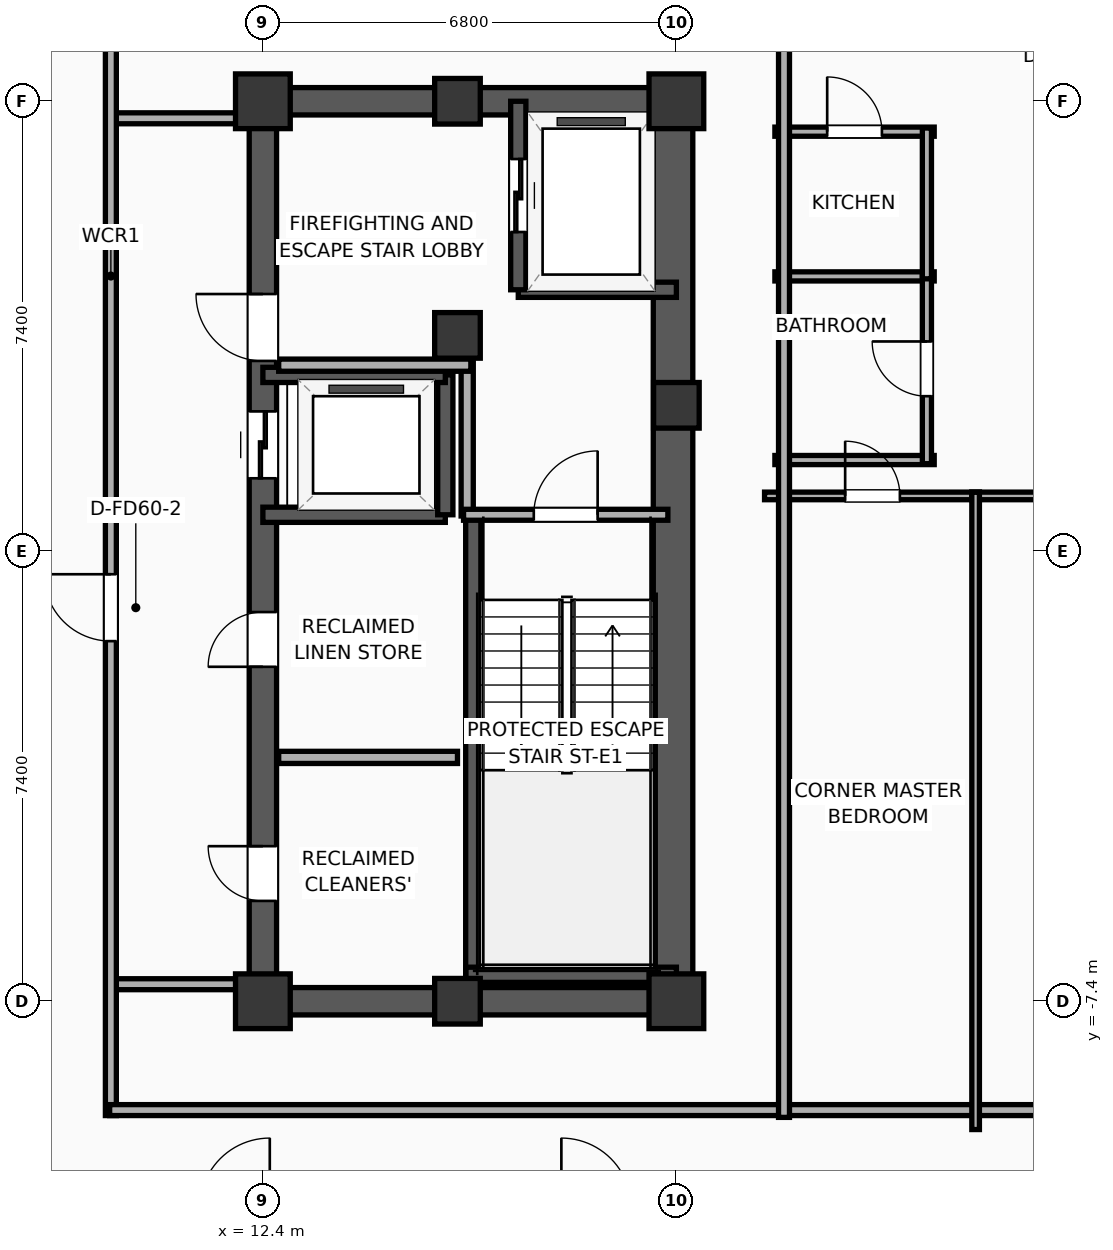
"""IFC4 building model, lengths in metres.
Left out: names, types, materials, properties, quantities, classifications, styles, units other than length and angle.
Written with IfcOpenShell. Run it as: python <this file> out.ifc"""

import sys

from ifc_helpers import new_model, si_unit, direction, frame, frame_2d, origin, origin_2d, place, context, subcontext, project, spatial, rectangle, extrude, element, fill, save


model = new_model("IFC4")
c1 = context("Model", 3, precision=1e-05, world=origin(), true_north=direction((0.0, 1.0)))
c2 = subcontext(c1, "Body", "Model", "MODEL_VIEW")
j1 = project(units=[si_unit("LENGTHUNIT", "METRE"), si_unit("PLANEANGLEUNIT", "RADIAN")], contexts=[c1])
p1 = place(None, origin())
s1 = spatial("IfcSite", under=j1, at=p1, CompositionType="ELEMENT")
p2 = place(p1, origin())
s2 = spatial("IfcBuilding", under=s1, at=p2, CompositionType="ELEMENT")
p3 = place(p2, frame((0.0, 0.0, 215.8)))
s3 = spatial("IfcBuildingStorey", under=s2, at=p3, CompositionType="ELEMENT", Elevation=215.8)
p4 = place(p3, frame((12.4, -7.4, 0.0), z_axis=(0.0, 0.0, 1.0), x_axis=(1.0, 0.0, 0.0)))
e1 = element("IfcColumn", 1, at=p4, inside=s3, PredefinedType="COLUMN", context=c2, shape_type="SweptSolid", body=[
    extrude(rectangle(XDim=0.9, YDim=0.9, at=origin_2d()), origin(), (0.0, 0.0, 1.0), 3.9),
])
p5 = place(p3, frame((15.6, 3.55, 0.0), z_axis=(0.0, 0.0, 1.0), x_axis=(1.0, 0.0, 0.0)))
e2 = element("IfcColumn", 2, at=p5, inside=s3, PredefinedType="COLUMN", context=c2, shape_type="SweptSolid", body=[
    extrude(rectangle(XDim=0.75, YDim=0.75, at=origin_2d()), origin(), (0.0, 0.0, 1.0), 3.9),
])
p6 = place(p3, frame((12.4, 7.4, 0.0), z_axis=(0.0, 0.0, 1.0), x_axis=(1.0, 0.0, 0.0)))
e3 = element("IfcColumn", 3, at=p6, inside=s3, PredefinedType="COLUMN", context=c2, shape_type="SweptSolid", body=[
    extrude(rectangle(XDim=0.9, YDim=0.9, at=origin_2d()), origin(), (0.0, 0.0, 1.0), 3.9),
])
for number, where, z_axis, x_axis in (
    (4, (15.6, -7.4, 0.0), (0.0, 0.0, 1.0), (1.0, 0.0, 0.0)),
    (5, (15.6, 7.4, 0.0), (0.0, 0.0, 1.0), (1.0, 0.0, 0.0)),
):
    element("IfcColumn", number, at=place(p3, frame(where, z_axis=z_axis, x_axis=x_axis)), inside=s3, PredefinedType="COLUMN", context=c2, shape_type="SweptSolid", body=[
        extrude(rectangle(XDim=0.75, YDim=0.75, at=origin_2d()), origin(), (0.0, 0.0, 1.0), 3.9),
    ])
p7 = place(p3, frame((19.2, -7.4, 0.0), z_axis=(0.0, 0.0, 1.0), x_axis=(1.0, 0.0, 0.0)))
e6 = element("IfcColumn", 6, at=p7, inside=s3, PredefinedType="COLUMN", context=c2, shape_type="SweptSolid", body=[
    extrude(rectangle(XDim=0.9, YDim=0.9, at=origin_2d()), origin(), (0.0, 0.0, 1.0), 3.9),
])
p8 = place(p3, frame((19.2, 2.4, 0.0), z_axis=(0.0, 0.0, 1.0), x_axis=(1.0, 0.0, 0.0)))
e7 = element("IfcColumn", 7, at=p8, inside=s3, PredefinedType="COLUMN", context=c2, shape_type="SweptSolid", body=[
    extrude(rectangle(XDim=0.75, YDim=0.75, at=origin_2d()), origin(), (0.0, 0.0, 1.0), 3.9),
])
p9 = place(p3, frame((19.2, 7.4, 0.0), z_axis=(0.0, 0.0, 1.0), x_axis=(1.0, 0.0, 0.0)))
e8 = element("IfcColumn", 8, at=p9, inside=s3, PredefinedType="COLUMN", context=c2, shape_type="SweptSolid", body=[
    extrude(rectangle(XDim=0.9, YDim=0.9, at=origin_2d()), origin(), (0.0, 0.0, 1.0), 3.9),
])
for number, where, z_axis, x_axis in (
    (9, (12.175, -7.4, 0.0), (0.0, 0.0, 1.0), (1.0, 0.0, 0.0)),
    (10, (12.175, 7.4, 0.0), (0.0, 0.0, 1.0), (1.0, 0.0, 0.0)),
):
    element("IfcWall", number, at=place(p3, frame(where, z_axis=z_axis, x_axis=x_axis)), inside=s3, PredefinedType="SHEAR", context=c2, shape_type="SweptSolid", body=[
        extrude(rectangle(XDim=7.25, YDim=0.45, at=frame_2d((3.625, 0.0))), origin(), (0.0, 0.0, 1.0), 3.65),
    ])
p10 = place(p3, frame((12.4, -7.4, 0.0), z_axis=(0.0, 0.0, 1.0), x_axis=(0.0, 1.0, 0.0)))
e11 = element("IfcWall", 11, at=p10, inside=s3, PredefinedType="SHEAR", context=c2, shape_type="SweptSolid", body=[
    extrude(rectangle(XDim=14.8, YDim=0.45, at=frame_2d((7.4, 0.0))), origin(), (0.0, 0.0, 1.0), 3.65),
])
p11 = place(p10, frame((8.6, 0.0, 0.0)))
e12 = element("IfcOpeningElement", 12, at=p11, cuts=e11, PredefinedType="OPENING", context=c2, shape_type="SweptSolid", body=[
    extrude(rectangle(XDim=1.1, YDim=2.05, at=frame_2d((0.55, 1.025))), frame((0.0, 0.235, 0.0), z_axis=(0.0, -1.0, 0.0), x_axis=(1.0, 0.0, 0.0)), (0.0, 0.0, 1.0), 0.47),
])
p12 = place(p10, frame((10.53, 0.0, 0.0)))
e13 = element("IfcOpeningElement", 13, at=p12, cuts=e11, PredefinedType="OPENING", context=c2, shape_type="SweptSolid", body=[
    extrude(rectangle(XDim=1.1, YDim=2.05, at=frame_2d((0.55, 1.025))), frame((0.0, 0.235, 0.0), z_axis=(0.0, -1.0, 0.0), x_axis=(1.0, 0.0, 0.0)), (0.0, 0.0, 1.0), 0.47),
])
p13 = place(p10, frame((1.65, 0.0, 0.0)))
e14 = element("IfcOpeningElement", 14, at=p13, cuts=e11, PredefinedType="OPENING", context=c2, shape_type="SweptSolid", body=[
    extrude(rectangle(XDim=0.9, YDim=2.05, at=frame_2d((0.45, 1.025))), frame((0.0, 0.235, 0.0), z_axis=(0.0, -1.0, 0.0), x_axis=(1.0, 0.0, 0.0)), (0.0, 0.0, 1.0), 0.47),
])
p14 = place(p10, frame((5.5, 0.0, 0.0)))
e15 = element("IfcOpeningElement", 15, at=p14, cuts=e11, PredefinedType="OPENING", context=c2, shape_type="SweptSolid", body=[
    extrude(rectangle(XDim=0.9, YDim=2.05, at=frame_2d((0.45, 1.025))), frame((0.0, 0.235, 0.0), z_axis=(0.0, -1.0, 0.0), x_axis=(1.0, 0.0, 0.0)), (0.0, 0.0, 1.0), 0.47),
])
p15 = place(p3, frame((19.145, -7.4, 0.0), z_axis=(0.0, 0.0, 1.0), x_axis=(0.0, 1.0, 0.0)))
e16 = element("IfcWall", 16, at=p15, inside=s3, PredefinedType="SHEAR", context=c2, shape_type="SweptSolid", body=[
    extrude(rectangle(XDim=14.8, YDim=0.65, at=frame_2d((7.4, 0.0))), origin(), (0.0, 0.0, 1.0), 3.65),
])
p16 = place(p3, frame((15.86, -7.085, 0.0), z_axis=(0.0, 0.0, 1.0), x_axis=(0.0, 1.0, 0.0)))
e17 = element("IfcWall", 17, at=p16, inside=s3, PredefinedType="SOLIDWALL", context=c2, shape_type="SweptSolid", body=[
    extrude(rectangle(XDim=7.685, YDim=0.25, at=frame_2d((3.843, 0.0))), origin(), (0.0, 0.0, 1.0), 3.65),
])
p17 = place(p3, frame((15.74, -6.965, 0.0), z_axis=(0.0, 0.0, 1.0), x_axis=(1.0, 0.0, 0.0)))
e18 = element("IfcWall", 18, at=p17, inside=s3, PredefinedType="SOLIDWALL", context=c2, shape_type="SweptSolid", body=[
    extrude(rectangle(XDim=3.46, YDim=0.25, at=frame_2d((1.73, 0.0))), origin(), (0.0, 0.0, 1.0), 3.65),
])
p18 = place(p3, frame((16.6, 4.3, 0.0), z_axis=(0.0, 0.0, 1.0), x_axis=(1.0, 0.0, 0.0)))
e19 = element("IfcWall", 19, at=p18, inside=s3, PredefinedType="SOLIDWALL", context=c2, shape_type="SweptSolid", body=[
    extrude(rectangle(XDim=2.6, YDim=0.25, at=frame_2d((1.3, 0.0))), origin(), (0.0, 0.0, 1.0), 3.65),
])
p19 = place(p3, frame((16.6, 7.4, 0.0), z_axis=(0.0, 0.0, 1.0), x_axis=(0.0, -1.0, 0.0)))
e20 = element("IfcWall", 20, at=p19, inside=s3, PredefinedType="SOLIDWALL", context=c2, shape_type="SweptSolid", body=[
    extrude(rectangle(XDim=3.1, YDim=0.25, at=frame_2d((1.55, 0.0))), origin(), (0.0, 0.0, 1.0), 3.65),
])
p20 = place(p19, frame((0.95, 0.0, 0.0)))
e21 = element("IfcOpeningElement", 21, at=p20, cuts=e20, PredefinedType="OPENING", context=c2, shape_type="SweptSolid", body=[
    extrude(rectangle(XDim=1.2, YDim=2.05, at=frame_2d((0.6, 1.025))), frame((0.0, 0.135, 0.0), z_axis=(0.0, -1.0, 0.0), x_axis=(1.0, 0.0, 0.0)), (0.0, 0.0, 1.0), 0.27),
])
p21 = place(p3, frame((12.4, 0.6, 0.0), z_axis=(0.0, 0.0, 1.0), x_axis=(1.0, 0.0, 0.0)))
e22 = element("IfcWall", 22, at=p21, inside=s3, PredefinedType="SOLIDWALL", context=c2, shape_type="SweptSolid", body=[
    extrude(rectangle(XDim=3.0, YDim=0.25, at=frame_2d((1.5, 0.0))), origin(), (0.0, 0.0, 1.0), 3.65),
])
p22 = place(p3, frame((15.4, 0.6, 0.0), z_axis=(0.0, 0.0, 1.0), x_axis=(0.0, 1.0, 0.0)))
e23 = element("IfcWall", 23, at=p22, inside=s3, PredefinedType="SOLIDWALL", context=c2, shape_type="SweptSolid", body=[
    extrude(rectangle(XDim=2.3, YDim=0.25, at=frame_2d((1.15, 0.0))), origin(), (0.0, 0.0, 1.0), 3.65),
])
p23 = place(p3, frame((15.4, 2.9, 0.0), z_axis=(0.0, 0.0, 1.0), x_axis=(-1.0, 0.0, 0.0)))
e24 = element("IfcWall", 24, at=p23, inside=s3, PredefinedType="SOLIDWALL", context=c2, shape_type="SweptSolid", body=[
    extrude(rectangle(XDim=3.0, YDim=0.25, at=frame_2d((1.5, 0.0))), origin(), (0.0, 0.0, 1.0), 3.65),
])
p24 = place(p3, frame((15.76, 0.58, 0.0), z_axis=(0.0, 0.0, 1.0), x_axis=(0.0, 1.0, 0.0)))
e25 = element("IfcWall", 25, at=p24, inside=s3, PredefinedType="PARTITIONING", context=c2, shape_type="SweptSolid", body=[
    extrude(rectangle(XDim=2.52, YDim=0.2, at=frame_2d((1.26, 0.0))), origin(), (0.0, 0.0, 1.0), 3.65),
])
p25 = place(p3, frame((12.66, 3.06, 0.0), z_axis=(0.0, 0.0, 1.0), x_axis=(1.0, 0.0, 0.0)))
e26 = element("IfcWall", 26, at=p25, inside=s3, PredefinedType="PARTITIONING", context=c2, shape_type="SweptSolid", body=[
    extrude(rectangle(XDim=3.16, YDim=0.2, at=frame_2d((1.58, 0.0))), origin(), (0.0, 0.0, 1.0), 3.65),
])
p26 = place(p3, frame((15.7, 0.6, 0.0), z_axis=(0.0, 0.0, 1.0), x_axis=(1.0, 0.0, 0.0)))
e27 = element("IfcWall", 27, at=p26, inside=s3, PredefinedType="PARTITIONING", context=c2, shape_type="SweptSolid", body=[
    extrude(rectangle(XDim=3.36, YDim=0.18, at=frame_2d((1.68, 0.0))), origin(), (0.0, 0.0, 1.0), 3.65),
])
p27 = place(p26, frame((1.155, 0.0, 0.0)))
e28 = element("IfcOpeningElement", 28, at=p27, cuts=e27, PredefinedType="OPENING", context=c2, shape_type="SweptSolid", body=[
    extrude(rectangle(XDim=1.05, YDim=2.05, at=frame_2d((0.525, 1.025))), frame((0.0, 0.1, 0.0), z_axis=(0.0, -1.0, 0.0), x_axis=(1.0, 0.0, 0.0)), (0.0, 0.0, 1.0), 0.2),
])
p28 = place(p3, frame((12.66, -3.39, 0.0), z_axis=(0.0, 0.0, 1.0), x_axis=(1.0, 0.0, 0.0)))
e29 = element("IfcWall", 29, at=p28, inside=s3, PredefinedType="PARTITIONING", context=c2, shape_type="SweptSolid", body=[
    extrude(rectangle(XDim=2.94, YDim=0.2, at=frame_2d((1.47, 0.0))), origin(), (0.0, 0.0, 1.0), 3.65),
])
for number, where, z_axis, x_axis in (
    (30, (9.88, 7.12, 0.0), (0.0, 0.0, 1.0), (1.0, 0.0, 0.0)),
    (31, (9.88, -7.12, 0.0), (0.0, 0.0, 1.0), (1.0, 0.0, 0.0)),
):
    element("IfcWall", number, at=place(p3, frame(where, z_axis=z_axis, x_axis=x_axis)), inside=s3, PredefinedType="PARTITIONING", context=c2, shape_type="SweptSolid", body=[
        extrude(rectangle(XDim=2.27, YDim=0.18, at=frame_2d((1.135, 0.0))), origin(), (0.0, 0.0, 1.0), 3.65),
    ])
p29 = place(p3, frame((9.9, -9.28, 0.0), z_axis=(0.0, 0.0, 1.0), x_axis=(0.0, 1.0, 0.0)))
e32 = element("IfcWall", 32, at=p29, inside=s3, PredefinedType="PARTITIONING", context=c2, shape_type="SweptSolid", body=[
    extrude(rectangle(XDim=18.56, YDim=0.18, at=frame_2d((9.28, 0.0))), origin(), (0.0, 0.0, 1.0), 3.65),
])
p30 = place(p29, frame((7.802, 0.0, 0.0)))
e33 = element("IfcOpeningElement", 33, at=p30, cuts=e32, PredefinedType="OPENING", context=c2, shape_type="SweptSolid", body=[
    extrude(rectangle(XDim=1.1, YDim=2.05, at=frame_2d((0.55, 1.025))), frame((0.0, 0.1, 0.0), z_axis=(0.0, -1.0, 0.0), x_axis=(1.0, 0.0, 0.0)), (0.0, 0.0, 1.0), 0.2),
])
p31 = place(p3, frame((9.88, -9.19, 0.0), z_axis=(0.0, 0.0, 1.0), x_axis=(1.0, 0.0, 0.0)))
e34 = element("IfcWall", 34, at=p31, inside=s3, PredefinedType="PARTITIONING", context=c2, shape_type="SweptSolid", body=[
    extrude(rectangle(XDim=20.35, YDim=0.18, at=frame_2d((10.175, 0.0))), origin(), (0.0, 0.0, 1.0), 3.65),
])
p32 = place(p3, frame((20.82, 6.9, 0.0), z_axis=(0.0, 0.0, 1.0), x_axis=(1.0, 0.0, 0.0)))
e35 = element("IfcWall", 35, at=p32, inside=s3, PredefinedType="PLUMBINGWALL", context=c2, shape_type="SweptSolid", body=[
    extrude(rectangle(XDim=2.62, YDim=0.15, at=frame_2d((1.31, 0.0))), origin(), (0.0, 0.0, 1.0), 3.65),
])
p33 = place(p32, frame((0.86, 0.0, 0.0)))
e36 = element("IfcOpeningElement", 36, at=p33, cuts=e35, PredefinedType="OPENING", context=c2, shape_type="SweptSolid", body=[
    extrude(rectangle(XDim=0.9, YDim=2.05, at=frame_2d((0.45, 1.025))), frame((0.0, 0.085, 0.0), z_axis=(0.0, -1.0, 0.0), x_axis=(1.0, 0.0, 0.0)), (0.0, 0.0, 1.0), 0.17),
])
for number, where, z_axis, x_axis in (
    (37, (20.82, 4.52, 0.0), (0.0, 0.0, 1.0), (1.0, 0.0, 0.0)),
    (38, (20.82, 1.5, 0.0), (0.0, 0.0, 1.0), (1.0, 0.0, 0.0)),
):
    element("IfcWall", number, at=place(p3, frame(where, z_axis=z_axis, x_axis=x_axis)), inside=s3, PredefinedType="PLUMBINGWALL", context=c2, shape_type="SweptSolid", body=[
        extrude(rectangle(XDim=2.62, YDim=0.15, at=frame_2d((1.31, 0.0))), origin(), (0.0, 0.0, 1.0), 3.65),
    ])
p34 = place(p3, frame((23.32, 1.44, 0.0), z_axis=(0.0, 0.0, 1.0), x_axis=(0.0, 1.0, 0.0)))
e39 = element("IfcWall", 39, at=p34, inside=s3, PredefinedType="PLUMBINGWALL", context=c2, shape_type="SweptSolid", body=[
    extrude(rectangle(XDim=3.12, YDim=0.15, at=frame_2d((1.56, 0.0))), origin(), (0.0, 0.0, 1.0), 3.65),
])
p35 = place(p34, frame((1.11, 0.0, 0.0)))
e40 = element("IfcOpeningElement", 40, at=p35, cuts=e39, PredefinedType="OPENING", context=c2, shape_type="SweptSolid", body=[
    extrude(rectangle(XDim=0.9, YDim=2.05, at=frame_2d((0.45, 1.025))), frame((0.0, 0.085, 0.0), z_axis=(0.0, -1.0, 0.0), x_axis=(1.0, 0.0, 0.0)), (0.0, 0.0, 1.0), 0.17),
])
p36 = place(p3, frame((23.32, 4.48, 0.0), z_axis=(0.0, 0.0, 1.0), x_axis=(0.0, 1.0, 0.0)))
e41 = element("IfcWall", 41, at=p36, inside=s3, PredefinedType="PLUMBINGWALL", context=c2, shape_type="SweptSolid", body=[
    extrude(rectangle(XDim=2.48, YDim=0.15, at=frame_2d((1.24, 0.0))), origin(), (0.0, 0.0, 1.0), 3.65),
])
p37 = place(p3, frame((20.65, 0.91, 0.0), z_axis=(0.0, 0.0, 1.0), x_axis=(1.0, 0.0, 0.0)))
e42 = element("IfcWall", 42, at=p37, inside=s3, PredefinedType="PARTITIONING", context=c2, shape_type="SweptSolid", body=[
    extrude(rectangle(XDim=3.534, YDim=0.125, at=frame_2d((1.767, 0.0))), origin(), (0.0, 0.0, 1.0), 3.65),
])
p38 = place(p37, frame((1.325, 0.0, 0.0)))
e43 = element("IfcOpeningElement", 43, at=p38, cuts=e42, PredefinedType="OPENING", context=c2, shape_type="SweptSolid", body=[
    extrude(rectangle(XDim=0.9, YDim=2.05, at=frame_2d((0.45, 1.025))), frame((0.0, 0.073, 0.0), z_axis=(0.0, -1.0, 0.0), x_axis=(1.0, 0.0, 0.0)), (0.0, 0.0, 1.0), 0.145),
])
p39 = place(p3, frame((24.059, 0.91, 0.0), z_axis=(0.0, 0.0, 1.0), x_axis=(1.0, 0.0, 0.0)))
e44 = element("IfcWall", 44, at=p39, inside=s3, PredefinedType="PARTITIONING", context=c2, shape_type="SweptSolid", body=[
    extrude(rectangle(XDim=3.183, YDim=0.125, at=frame_2d((1.591, 0.0))), origin(), (0.0, 0.0, 1.0), 3.65),
])
p40 = place(p39, frame((1.142, 0.0, 0.0)))
e45 = element("IfcOpeningElement", 45, at=p40, cuts=e44, PredefinedType="OPENING", context=c2, shape_type="SweptSolid", body=[
    extrude(rectangle(XDim=0.9, YDim=2.05, at=frame_2d((0.45, 1.025))), frame((0.0, 0.073, 0.0), z_axis=(0.0, -1.0, 0.0), x_axis=(1.0, 0.0, 0.0)), (0.0, 0.0, 1.0), 0.145),
])
p41 = place(p3, frame((24.121, -9.51, 0.0), z_axis=(0.0, 0.0, 1.0), x_axis=(0.0, 1.0, 0.0)))
e46 = element("IfcWall", 46, at=p41, inside=s3, PredefinedType="PARTITIONING", context=c2, shape_type="SweptSolid", body=[
    extrude(rectangle(XDim=10.48, YDim=0.125, at=frame_2d((5.24, 0.0))), origin(), (0.0, 0.0, 1.0), 3.65),
])
p42 = place(p3, frame((20.97, -9.31, 0.0), z_axis=(0.0, 0.0, 1.0), x_axis=(0.0, 1.0, 0.0)))
e47 = element("IfcWall", 47, at=p42, inside=s3, PredefinedType="PARTITIONING", context=c2, shape_type="SweptSolid", body=[
    extrude(rectangle(XDim=18.62, YDim=0.18, at=frame_2d((9.31, 0.0))), origin(), (0.0, 0.0, 1.0), 3.65),
])
p43 = place(p20, origin())
e48 = element("IfcDoor", 48, at=p43, inside=s3, OperationType="SLIDING_TO_LEFT", PredefinedType="DOOR", context=c2, shape_type="SweptSolid", body=[
    extrude(rectangle(XDim=1.2, YDim=2.05, at=frame_2d((0.6, 1.025))), frame((0.0, 0.025, 0.0), z_axis=(0.0, -1.0, 0.0), x_axis=(1.0, 0.0, 0.0)), (0.0, 0.0, 1.0), 0.05),
])
fill(e21, e48)
p44 = place(p11, origin())
e49 = element("IfcDoor", 49, at=p44, inside=s3, OperationType="SLIDING_TO_LEFT", PredefinedType="DOOR", context=c2, shape_type="SweptSolid", body=[
    extrude(rectangle(XDim=1.1, YDim=2.05, at=frame_2d((0.55, 1.025))), frame((0.0, 0.025, 0.0), z_axis=(0.0, -1.0, 0.0), x_axis=(1.0, 0.0, 0.0)), (0.0, 0.0, 1.0), 0.05),
])
fill(e12, e49)
p45 = place(p27, origin())
e50 = element("IfcDoor", 50, at=p45, inside=s3, OperationType="SINGLE_SWING_RIGHT", PredefinedType="DOOR", context=c2, shape_type="SweptSolid", body=[
    extrude(rectangle(XDim=1.05, YDim=2.05, at=frame_2d((0.525, 1.025))), frame((0.0, 0.025, 0.0), z_axis=(0.0, -1.0, 0.0), x_axis=(1.0, 0.0, 0.0)), (0.0, 0.0, 1.0), 0.05),
])
fill(e28, e50)
p46 = place(p30, origin())
e51 = element("IfcDoor", 51, at=p46, inside=s3, OperationType="SINGLE_SWING_RIGHT", PredefinedType="DOOR", context=c2, shape_type="SweptSolid", body=[
    extrude(rectangle(XDim=1.1, YDim=2.05, at=frame_2d((0.55, 1.025))), frame((0.0, 0.025, 0.0), z_axis=(0.0, -1.0, 0.0), x_axis=(1.0, 0.0, 0.0)), (0.0, 0.0, 1.0), 0.05),
])
fill(e33, e51)
p47 = place(p33, origin())
e52 = element("IfcDoor", 52, at=p47, inside=s3, OperationType="SINGLE_SWING_LEFT", PredefinedType="DOOR", context=c2, shape_type="SweptSolid", body=[
    extrude(rectangle(XDim=0.9, YDim=2.05, at=frame_2d((0.45, 1.025))), frame((0.0, 0.025, 0.0), z_axis=(0.0, -1.0, 0.0), x_axis=(1.0, 0.0, 0.0)), (0.0, 0.0, 1.0), 0.05),
])
fill(e36, e52)
p48 = place(p35, origin())
e53 = element("IfcDoor", 53, at=p48, inside=s3, OperationType="SINGLE_SWING_RIGHT", PredefinedType="DOOR", context=c2, shape_type="SweptSolid", body=[
    extrude(rectangle(XDim=0.9, YDim=2.05, at=frame_2d((0.45, 1.025))), frame((0.0, 0.025, 0.0), z_axis=(0.0, -1.0, 0.0), x_axis=(1.0, 0.0, 0.0)), (0.0, 0.0, 1.0), 0.05),
])
fill(e40, e53)
p49 = place(p38, origin())
e54 = element("IfcDoor", 54, at=p49, inside=s3, OperationType="SINGLE_SWING_LEFT", PredefinedType="DOOR", context=c2, shape_type="SweptSolid", body=[
    extrude(rectangle(XDim=0.9, YDim=2.05, at=frame_2d((0.45, 1.025))), frame((0.0, 0.025, 0.0), z_axis=(0.0, -1.0, 0.0), x_axis=(1.0, 0.0, 0.0)), (0.0, 0.0, 1.0), 0.05),
])
fill(e43, e54)
p50 = place(p12, origin())
e55 = element("IfcDoor", 55, at=p50, inside=s3, OperationType="SINGLE_SWING_RIGHT", PredefinedType="DOOR", context=c2, shape_type="SweptSolid", body=[
    extrude(rectangle(XDim=1.1, YDim=2.05, at=frame_2d((0.55, 1.025))), frame((0.0, 0.025, 0.0), z_axis=(0.0, -1.0, 0.0), x_axis=(1.0, 0.0, 0.0)), (0.0, 0.0, 1.0), 0.05),
])
fill(e13, e55)
p51 = place(p13, origin())
e56 = element("IfcDoor", 56, at=p51, inside=s3, OperationType="SINGLE_SWING_RIGHT", PredefinedType="DOOR", context=c2, shape_type="SweptSolid", body=[
    extrude(rectangle(XDim=0.9, YDim=2.05, at=frame_2d((0.45, 1.025))), frame((0.0, 0.025, 0.0), z_axis=(0.0, -1.0, 0.0), x_axis=(1.0, 0.0, 0.0)), (0.0, 0.0, 1.0), 0.05),
])
fill(e14, e56)
p52 = place(p14, origin())
e57 = element("IfcDoor", 57, at=p52, inside=s3, OperationType="SINGLE_SWING_LEFT", PredefinedType="DOOR", context=c2, shape_type="SweptSolid", body=[
    extrude(rectangle(XDim=0.9, YDim=2.05, at=frame_2d((0.45, 1.025))), frame((0.0, 0.025, 0.0), z_axis=(0.0, -1.0, 0.0), x_axis=(1.0, 0.0, 0.0)), (0.0, 0.0, 1.0), 0.05),
])
fill(e15, e57)
save(model, sys.argv[1])
